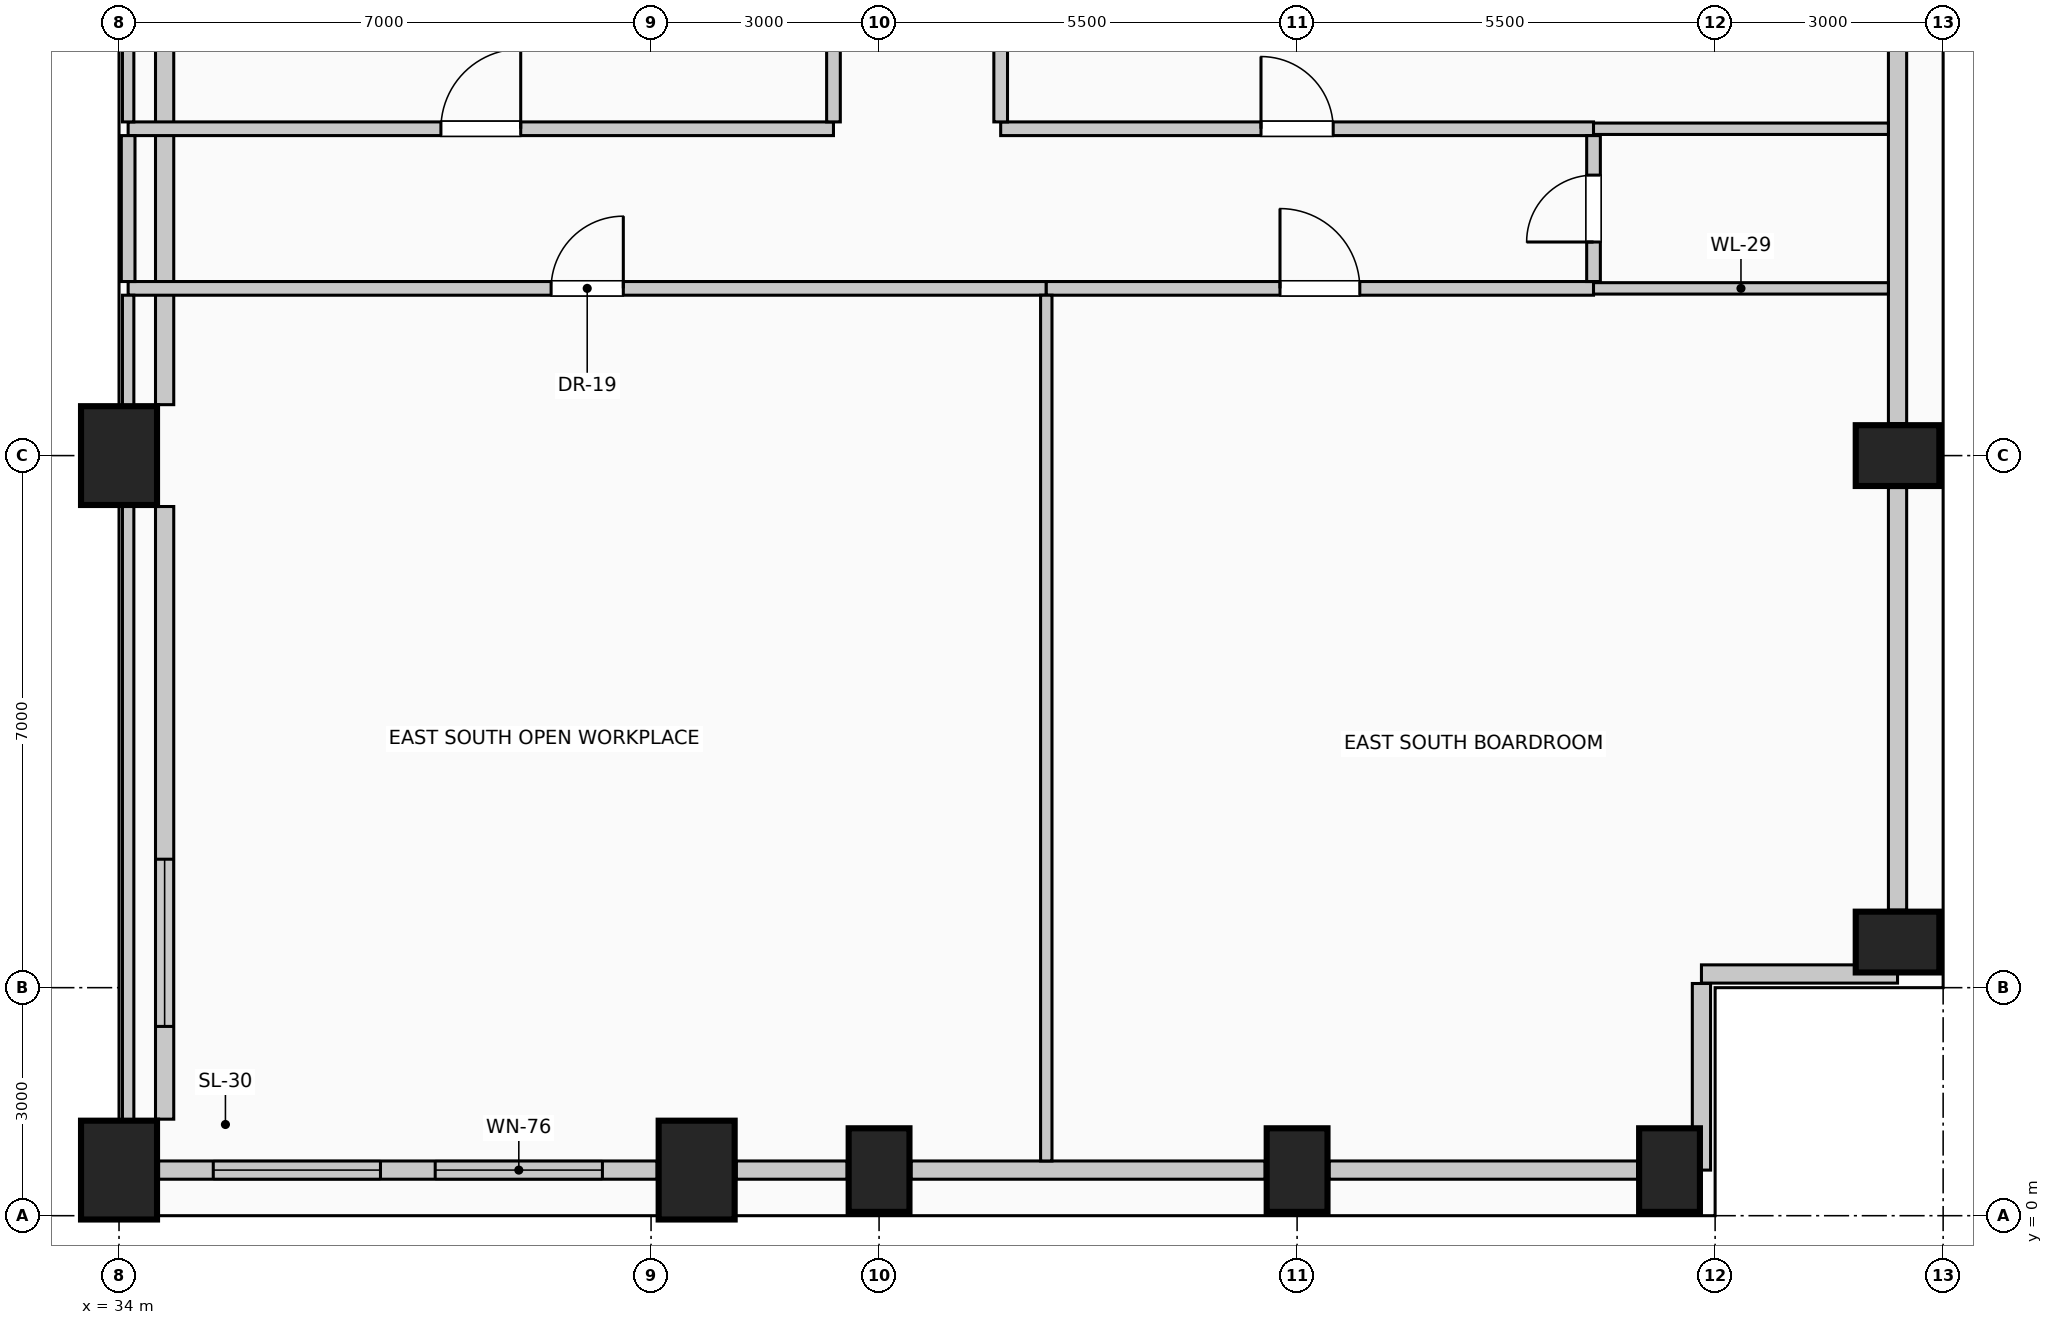
"""IFC4 building model, lengths in metres.
Left out: names, types, materials, properties, quantities, classifications, styles, units other than length and angle.
Written with IfcOpenShell. Run it as: python <this file> out.ifc"""

import sys

from ifc_helpers import new_model, si_unit, direction, frame, frame_2d, origin, origin_2d, place, context, subcontext, project, spatial, rectangle, extrude, element, fill, save


model = new_model("IFC4")
c1 = context("Model", 3, precision=1e-05, world=origin(), true_north=direction((0.0, 1.0)))
c2 = subcontext(c1, "Body", "Model", "MODEL_VIEW")
j1 = project(units=[si_unit("LENGTHUNIT", "METRE"), si_unit("PLANEANGLEUNIT", "RADIAN")], contexts=[c1])
p1 = place(None, origin())
s1 = spatial("IfcSite", under=j1, at=p1, CompositionType="ELEMENT")
p2 = place(p1, origin())
s2 = spatial("IfcBuilding", under=s1, at=p2, CompositionType="ELEMENT")
p3 = place(p2, frame((0.0, 0.0, 194.6)))
s3 = spatial("IfcBuildingStorey", under=s2, at=p3, CompositionType="ELEMENT", Elevation=194.6)
for number, where, z_axis, x_axis in (
    (1, (34.0, 0.6, 0.0), (0.0, 0.0, 1.0), (1.0, 0.0, 0.0)),
    (2, (41.6, 0.6, 0.0), (0.0, 0.0, 1.0), (1.0, 0.0, 0.0)),
):
    element("IfcColumn", number, at=place(p3, frame(where, z_axis=z_axis, x_axis=x_axis)), inside=s3, PredefinedType="COLUMN", context=c2, shape_type="SweptSolid", body=[
        extrude(rectangle(XDim=1.0, YDim=1.3, at=origin_2d()), origin(), (0.0, 0.0, 1.0), 4.0),
    ])
for number, where, z_axis, x_axis in (
    (3, (44.0, 0.6, 0.0), (0.0, 0.0, 1.0), (1.0, 0.0, 0.0)),
    (4, (49.5, 0.6, 0.0), (0.0, 0.0, 1.0), (1.0, 0.0, 0.0)),
    (5, (54.4, 0.6, 0.0), (0.0, 0.0, 1.0), (1.0, 0.0, 0.0)),
    (6, (57.4, 3.6, 0.0), (0.0, 0.0, 1.0), (0.0, 1.0, 0.0)),
    (7, (57.4, 10.0, 0.0), (0.0, 0.0, 1.0), (0.0, 1.0, 0.0)),
):
    element("IfcColumn", number, at=place(p3, frame(where, z_axis=z_axis, x_axis=x_axis)), inside=s3, PredefinedType="COLUMN", context=c2, shape_type="SweptSolid", body=[
        extrude(rectangle(XDim=0.8, YDim=1.1, at=origin_2d()), origin(), (0.0, 0.0, 1.0), 4.0),
    ])
p4 = place(p3, frame((34.0, 10.0, 0.0), z_axis=(0.0, 0.0, 1.0), x_axis=(1.0, 0.0, 0.0)))
e8 = element("IfcColumn", 8, at=p4, inside=s3, PredefinedType="COLUMN", context=c2, shape_type="SweptSolid", body=[
    extrude(rectangle(XDim=1.0, YDim=1.3, at=origin_2d()), origin(), (0.0, 0.0, 1.0), 4.0),
])
p5 = place(p3, frame((41.08, 0.6, 0.0), z_axis=(0.0, 0.0, 1.0), x_axis=(-1.0, 0.0, 0.0)))
e9 = element("IfcWall", 9, at=p5, inside=s3, PredefinedType="SOLIDWALL", context=c2, shape_type="SweptSolid", body=[
    extrude(rectangle(XDim=6.56, YDim=0.24, at=frame_2d((3.28, 0.0))), origin(), (0.0, 0.0, 1.0), 3.0),
])
p6 = place(p5, frame((0.72, 0.0, 0.42)))
e10 = element("IfcOpeningElement", 10, at=p6, cuts=e9, PredefinedType="OPENING", context=c2, shape_type="SweptSolid", body=[
    extrude(rectangle(XDim=2.2, YDim=1.95, at=frame_2d((1.1, 0.975))), frame((0.0, 0.13, 0.0), z_axis=(0.0, -1.0, 0.0), x_axis=(1.0, 0.0, 0.0)), (0.0, 0.0, 1.0), 0.26),
])
p7 = place(p5, frame((3.64, 0.0, 0.42)))
e11 = element("IfcOpeningElement", 11, at=p7, cuts=e9, PredefinedType="OPENING", context=c2, shape_type="SweptSolid", body=[
    extrude(rectangle(XDim=2.2, YDim=1.95, at=frame_2d((1.1, 0.975))), frame((0.0, 0.13, 0.0), z_axis=(0.0, -1.0, 0.0), x_axis=(1.0, 0.0, 0.0)), (0.0, 0.0, 1.0), 0.26),
])
p8 = place(p3, frame((43.58, 0.6, 0.0), z_axis=(0.0, 0.0, 1.0), x_axis=(-1.0, 0.0, 0.0)))
e12 = element("IfcWall", 12, at=p8, inside=s3, PredefinedType="SOLIDWALL", context=c2, shape_type="SweptSolid", body=[
    extrude(rectangle(XDim=1.46, YDim=0.24, at=frame_2d((0.73, 0.0))), origin(), (0.0, 0.0, 1.0), 3.0),
])
p9 = place(p3, frame((49.08, 0.6, 0.0), z_axis=(0.0, 0.0, 1.0), x_axis=(-1.0, 0.0, 0.0)))
e13 = element("IfcWall", 13, at=p9, inside=s3, PredefinedType="SOLIDWALL", context=c2, shape_type="SweptSolid", body=[
    extrude(rectangle(XDim=4.66, YDim=0.24, at=frame_2d((2.33, 0.0))), origin(), (0.0, 0.0, 1.0), 3.0),
])
p10 = place(p3, frame((53.98, 0.6, 0.0), z_axis=(0.0, 0.0, 1.0), x_axis=(-1.0, 0.0, 0.0)))
e14 = element("IfcWall", 14, at=p10, inside=s3, PredefinedType="SOLIDWALL", context=c2, shape_type="SweptSolid", body=[
    extrude(rectangle(XDim=4.06, YDim=0.24, at=frame_2d((2.03, 0.0))), origin(), (0.0, 0.0, 1.0), 3.0),
])
p11 = place(p3, frame((57.4, 9.58, 0.0), z_axis=(0.0, 0.0, 1.0), x_axis=(0.0, -1.0, 0.0)))
e15 = element("IfcWall", 15, at=p11, inside=s3, PredefinedType="SOLIDWALL", context=c2, shape_type="SweptSolid", body=[
    extrude(rectangle(XDim=5.56, YDim=0.24, at=frame_2d((2.78, 0.0))), origin(), (0.0, 0.0, 1.0), 3.0),
])
p12 = place(p3, frame((57.4, 17.58, 0.0), z_axis=(0.0, 0.0, 1.0), x_axis=(0.0, -1.0, 0.0)))
e16 = element("IfcWall", 16, at=p12, inside=s3, PredefinedType="SOLIDWALL", context=c2, shape_type="SweptSolid", body=[
    extrude(rectangle(XDim=7.16, YDim=0.24, at=frame_2d((3.58, 0.0))), origin(), (0.0, 0.0, 1.0), 3.0),
])
p13 = place(p3, frame((57.4, 3.18, 0.0), z_axis=(0.0, 0.0, 1.0), x_axis=(-1.0, 0.0, 0.0)))
e17 = element("IfcWall", 17, at=p13, inside=s3, PredefinedType="SOLIDWALL", context=c2, shape_type="SweptSolid", body=[
    extrude(rectangle(XDim=2.58, YDim=0.24, at=frame_2d((1.29, 0.0))), origin(), (0.0, 0.0, 1.0), 3.75),
])
p14 = place(p3, frame((54.82, 3.055, 0.0), z_axis=(0.0, 0.0, 1.0), x_axis=(0.0, -1.0, 0.0)))
e18 = element("IfcWall", 18, at=p14, inside=s3, PredefinedType="SOLIDWALL", context=c2, shape_type="SweptSolid", body=[
    extrude(rectangle(XDim=2.455, YDim=0.24, at=frame_2d((1.228, 0.0))), origin(), (0.0, 0.0, 1.0), 3.75),
])
p15 = place(p3, frame((34.6, 1.27, 0.0), z_axis=(0.0, 0.0, 1.0), x_axis=(0.0, 1.0, 0.0)))
e19 = element("IfcWall", 19, at=p15, inside=s3, PredefinedType="SOLIDWALL", context=c2, shape_type="SweptSolid", body=[
    extrude(rectangle(XDim=8.06, YDim=0.24, at=frame_2d((4.03, 0.0))), origin(), (0.0, 0.0, 1.0), 3.75),
])
p16 = place(p15, frame((1.22, 0.0, 0.42)))
e20 = element("IfcOpeningElement", 20, at=p16, cuts=e19, PredefinedType="OPENING", context=c2, shape_type="SweptSolid", body=[
    extrude(rectangle(XDim=2.2, YDim=1.95, at=frame_2d((1.1, 0.975))), frame((0.0, 0.13, 0.0), z_axis=(0.0, -1.0, 0.0), x_axis=(1.0, 0.0, 0.0)), (0.0, 0.0, 1.0), 0.26),
])
p17 = place(p3, frame((34.6, 10.67, 0.0), z_axis=(0.0, 0.0, 1.0), x_axis=(0.0, 1.0, 0.0)))
e21 = element("IfcWall", 21, at=p17, inside=s3, PredefinedType="SOLIDWALL", context=c2, shape_type="SweptSolid", body=[
    extrude(rectangle(XDim=6.66, YDim=0.24, at=frame_2d((3.33, 0.0))), origin(), (0.0, 0.0, 1.0), 3.75),
])
p18 = place(p3, frame((34.12, 12.2, 0.0), z_axis=(0.0, 0.0, 1.0), x_axis=(1.0, 0.0, 0.0)))
e22 = element("IfcWall", 22, at=p18, inside=s3, PredefinedType="PARTITIONING", context=c2, shape_type="SweptSolid", body=[
    extrude(rectangle(XDim=12.08, YDim=0.18, at=frame_2d((6.04, 0.0))), origin(), (0.0, 0.0, 1.0), 3.75),
])
p19 = place(p18, frame((5.565, 0.0, 0.0)))
e23 = element("IfcOpeningElement", 23, at=p19, cuts=e22, PredefinedType="OPENING", context=c2, shape_type="SweptSolid", body=[
    extrude(rectangle(XDim=0.95, YDim=2.15, at=frame_2d((0.475, 1.075))), frame((0.0, 0.1, 0.0), z_axis=(0.0, -1.0, 0.0), x_axis=(1.0, 0.0, 0.0)), (0.0, 0.0, 1.0), 0.2),
])
p20 = place(p3, frame((46.2, 12.2, 0.0), z_axis=(0.0, 0.0, 1.0), x_axis=(1.0, 0.0, 0.0)))
e24 = element("IfcWall", 24, at=p20, inside=s3, PredefinedType="PARTITIONING", context=c2, shape_type="SweptSolid", body=[
    extrude(rectangle(XDim=7.2, YDim=0.18, at=frame_2d((3.6, 0.0))), origin(), (0.0, 0.0, 1.0), 3.75),
])
p21 = place(p20, frame((3.075, 0.0, 0.0)))
e25 = element("IfcOpeningElement", 25, at=p21, cuts=e24, PredefinedType="OPENING", context=c2, shape_type="SweptSolid", body=[
    extrude(rectangle(XDim=1.05, YDim=2.15, at=frame_2d((0.525, 1.075))), frame((0.0, 0.1, 0.0), z_axis=(0.0, -1.0, 0.0), x_axis=(1.0, 0.0, 0.0)), (0.0, 0.0, 1.0), 0.2),
])
p22 = place(p3, frame((53.4, 12.2, 0.0), z_axis=(0.0, 0.0, 1.0), x_axis=(1.0, 0.0, 0.0)))
e26 = element("IfcWall", 26, at=p22, inside=s3, PredefinedType="PARTITIONING", context=c2, shape_type="SweptSolid", body=[
    extrude(rectangle(XDim=3.88, YDim=0.15, at=frame_2d((1.94, 0.0))), origin(), (0.0, 0.0, 1.0), 3.75),
])
p23 = place(p3, frame((34.12, 14.3, 0.0), z_axis=(0.0, 0.0, 1.0), x_axis=(1.0, 0.0, 0.0)))
e27 = element("IfcWall", 27, at=p23, inside=s3, PredefinedType="PARTITIONING", context=c2, shape_type="SweptSolid", body=[
    extrude(rectangle(XDim=9.28, YDim=0.18, at=frame_2d((4.64, 0.0))), origin(), (0.0, 0.0, 1.0), 3.75),
])
p24 = place(p23, frame((4.115, 0.0, 0.0)))
e28 = element("IfcOpeningElement", 28, at=p24, cuts=e27, PredefinedType="OPENING", context=c2, shape_type="SweptSolid", body=[
    extrude(rectangle(XDim=1.05, YDim=2.15, at=frame_2d((0.525, 1.075))), frame((0.0, 0.1, 0.0), z_axis=(0.0, -1.0, 0.0), x_axis=(1.0, 0.0, 0.0)), (0.0, 0.0, 1.0), 0.2),
])
p25 = place(p3, frame((45.6, 14.3, 0.0), z_axis=(0.0, 0.0, 1.0), x_axis=(1.0, 0.0, 0.0)))
e29 = element("IfcWall", 29, at=p25, inside=s3, PredefinedType="PARTITIONING", context=c2, shape_type="SweptSolid", body=[
    extrude(rectangle(XDim=7.8, YDim=0.18, at=frame_2d((3.9, 0.0))), origin(), (0.0, 0.0, 1.0), 3.75),
])
p26 = place(p25, frame((3.425, 0.0, 0.0)))
e30 = element("IfcOpeningElement", 30, at=p26, cuts=e29, PredefinedType="OPENING", context=c2, shape_type="SweptSolid", body=[
    extrude(rectangle(XDim=0.95, YDim=2.15, at=frame_2d((0.475, 1.075))), frame((0.0, 0.1, 0.0), z_axis=(0.0, -1.0, 0.0), x_axis=(1.0, 0.0, 0.0)), (0.0, 0.0, 1.0), 0.2),
])
p27 = place(p3, frame((53.4, 14.3, 0.0), z_axis=(0.0, 0.0, 1.0), x_axis=(1.0, 0.0, 0.0)))
e31 = element("IfcWall", 31, at=p27, inside=s3, PredefinedType="PARTITIONING", context=c2, shape_type="SweptSolid", body=[
    extrude(rectangle(XDim=3.88, YDim=0.15, at=frame_2d((1.94, 0.0))), origin(), (0.0, 0.0, 1.0), 3.75),
])
p28 = place(p3, frame((34.12, 1.25, 0.0), z_axis=(0.0, 0.0, 1.0), x_axis=(0.0, 1.0, 0.0)))
e32 = element("IfcWall", 32, at=p28, inside=s3, PredefinedType="PARTITIONING", context=c2, shape_type="SweptSolid", body=[
    extrude(rectangle(XDim=8.1, YDim=0.15, at=frame_2d((4.05, 0.0))), origin(), (0.0, 0.0, 1.0), 3.145),
])
p29 = place(p3, frame((34.12, 10.65, 0.0), z_axis=(0.0, 0.0, 1.0), x_axis=(0.0, 1.0, 0.0)))
e33 = element("IfcWall", 33, at=p29, inside=s3, PredefinedType="PARTITIONING", context=c2, shape_type="SweptSolid", body=[
    extrude(rectangle(XDim=1.46, YDim=0.15, at=frame_2d((0.73, 0.0))), origin(), (0.0, 0.0, 1.0), 3.145),
])
p30 = place(p3, frame((34.12, 12.29, 0.0), z_axis=(0.0, 0.0, 1.0), x_axis=(0.0, 1.0, 0.0)))
e34 = element("IfcWall", 34, at=p30, inside=s3, PredefinedType="PARTITIONING", context=c2, shape_type="SweptSolid", body=[
    extrude(rectangle(XDim=1.92, YDim=0.18, at=frame_2d((0.96, 0.0))), origin(), (0.0, 0.0, 1.0), 3.145),
])
p31 = place(p3, frame((34.12, 14.39, 0.0), z_axis=(0.0, 0.0, 1.0), x_axis=(0.0, 1.0, 0.0)))
e35 = element("IfcWall", 35, at=p31, inside=s3, PredefinedType="PARTITIONING", context=c2, shape_type="SweptSolid", body=[
    extrude(rectangle(XDim=2.96, YDim=0.15, at=frame_2d((1.48, 0.0))), origin(), (0.0, 0.0, 1.0), 3.145),
])
p32 = place(p3, frame((43.4, 14.39, 0.0), z_axis=(0.0, 0.0, 1.0), x_axis=(0.0, 1.0, 0.0)))
e36 = element("IfcWall", 36, at=p32, inside=s3, PredefinedType="PARTITIONING", context=c2, shape_type="SweptSolid", body=[
    extrude(rectangle(XDim=8.935, YDim=0.18, at=frame_2d((4.468, 0.0))), origin(), (0.0, 0.0, 1.0), 3.75),
])
p33 = place(p3, frame((45.6, 14.39, 0.0), z_axis=(0.0, 0.0, 1.0), x_axis=(0.0, 1.0, 0.0)))
e37 = element("IfcWall", 37, at=p33, inside=s3, PredefinedType="PARTITIONING", context=c2, shape_type="SweptSolid", body=[
    extrude(rectangle(XDim=14.148, YDim=0.18, at=frame_2d((7.074, 0.0))), origin(), (0.0, 0.0, 1.0), 3.75),
])
p34 = place(p3, frame((46.2, 0.72, 0.0), z_axis=(0.0, 0.0, 1.0), x_axis=(0.0, 1.0, 0.0)))
e38 = element("IfcWall", 38, at=p34, inside=s3, PredefinedType="PARTITIONING", context=c2, shape_type="SweptSolid", body=[
    extrude(rectangle(XDim=11.39, YDim=0.15, at=frame_2d((5.695, 0.0))), origin(), (0.0, 0.0, 1.0), 3.75),
])
p35 = place(p3, frame((53.4, 12.29, 0.0), z_axis=(0.0, 0.0, 1.0), x_axis=(0.0, 1.0, 0.0)))
e39 = element("IfcWall", 39, at=p35, inside=s3, PredefinedType="PARTITIONING", context=c2, shape_type="SweptSolid", body=[
    extrude(rectangle(XDim=1.92, YDim=0.18, at=frame_2d((0.96, 0.0))), origin(), (0.0, 0.0, 1.0), 3.75),
])
p36 = place(p35, frame((0.52, 0.0, 0.0)))
e40 = element("IfcOpeningElement", 40, at=p36, cuts=e39, PredefinedType="OPENING", context=c2, shape_type="SweptSolid", body=[
    extrude(rectangle(XDim=0.88, YDim=2.1, at=frame_2d((0.44, 1.05))), frame((0.0, 0.1, 0.0), z_axis=(0.0, -1.0, 0.0), x_axis=(1.0, 0.0, 0.0)), (0.0, 0.0, 1.0), 0.2),
])
p37 = place(p6, origin())
e41 = element("IfcWindow", 41, at=p37, inside=s3, PartitioningType="SINGLE_PANEL", PredefinedType="WINDOW", context=c2, shape_type="SweptSolid", body=[
    extrude(rectangle(XDim=2.2, YDim=1.95, at=frame_2d((1.1, 0.975))), frame((0.0, 0.03, 0.0), z_axis=(0.0, -1.0, 0.0), x_axis=(1.0, 0.0, 0.0)), (0.0, 0.0, 1.0), 0.06),
])
fill(e10, e41)
p38 = place(p7, origin())
e42 = element("IfcWindow", 42, at=p38, inside=s3, PartitioningType="SINGLE_PANEL", PredefinedType="WINDOW", context=c2, shape_type="SweptSolid", body=[
    extrude(rectangle(XDim=2.2, YDim=1.95, at=frame_2d((1.1, 0.975))), frame((0.0, 0.03, 0.0), z_axis=(0.0, -1.0, 0.0), x_axis=(1.0, 0.0, 0.0)), (0.0, 0.0, 1.0), 0.06),
])
fill(e11, e42)
p39 = place(p16, origin())
e43 = element("IfcWindow", 43, at=p39, inside=s3, PartitioningType="SINGLE_PANEL", PredefinedType="WINDOW", context=c2, shape_type="SweptSolid", body=[
    extrude(rectangle(XDim=2.2, YDim=1.95, at=frame_2d((1.1, 0.975))), frame((0.0, 0.03, 0.0), z_axis=(0.0, -1.0, 0.0), x_axis=(1.0, 0.0, 0.0)), (0.0, 0.0, 1.0), 0.06),
])
fill(e20, e43)
p40 = place(p19, origin())
e44 = element("IfcDoor", 44, at=p40, inside=s3, OperationType="SINGLE_SWING_RIGHT", PredefinedType="DOOR", context=c2, shape_type="SweptSolid", body=[
    extrude(rectangle(XDim=0.95, YDim=2.15, at=frame_2d((0.475, 1.075))), frame((0.0, 0.025, 0.0), z_axis=(0.0, -1.0, 0.0), x_axis=(1.0, 0.0, 0.0)), (0.0, 0.0, 1.0), 0.05),
])
fill(e23, e44)
p41 = place(p21, origin())
e45 = element("IfcDoor", 45, at=p41, inside=s3, OperationType="SINGLE_SWING_LEFT", PredefinedType="DOOR", context=c2, shape_type="SweptSolid", body=[
    extrude(rectangle(XDim=1.05, YDim=2.15, at=frame_2d((0.525, 1.075))), frame((0.0, 0.025, 0.0), z_axis=(0.0, -1.0, 0.0), x_axis=(1.0, 0.0, 0.0)), (0.0, 0.0, 1.0), 0.05),
])
fill(e25, e45)
p42 = place(p24, origin())
e46 = element("IfcDoor", 46, at=p42, inside=s3, OperationType="SINGLE_SWING_RIGHT", PredefinedType="DOOR", context=c2, shape_type="SweptSolid", body=[
    extrude(rectangle(XDim=1.05, YDim=2.15, at=frame_2d((0.525, 1.075))), frame((0.0, 0.025, 0.0), z_axis=(0.0, -1.0, 0.0), x_axis=(1.0, 0.0, 0.0)), (0.0, 0.0, 1.0), 0.05),
])
fill(e28, e46)
p43 = place(p26, origin())
e47 = element("IfcDoor", 47, at=p43, inside=s3, OperationType="SINGLE_SWING_LEFT", PredefinedType="DOOR", context=c2, shape_type="SweptSolid", body=[
    extrude(rectangle(XDim=0.95, YDim=2.15, at=frame_2d((0.475, 1.075))), frame((0.0, 0.025, 0.0), z_axis=(0.0, -1.0, 0.0), x_axis=(1.0, 0.0, 0.0)), (0.0, 0.0, 1.0), 0.05),
])
fill(e30, e47)
p44 = place(p36, origin())
e48 = element("IfcDoor", 48, at=p44, inside=s3, OperationType="SINGLE_SWING_LEFT", PredefinedType="DOOR", context=c2, shape_type="SweptSolid", body=[
    extrude(rectangle(XDim=0.88, YDim=2.1, at=frame_2d((0.44, 1.05))), frame((0.0, 0.025, 0.0), z_axis=(0.0, -1.0, 0.0), x_axis=(1.0, 0.0, 0.0)), (0.0, 0.0, 1.0), 0.05),
])
fill(e40, e48)
save(model, sys.argv[1])
